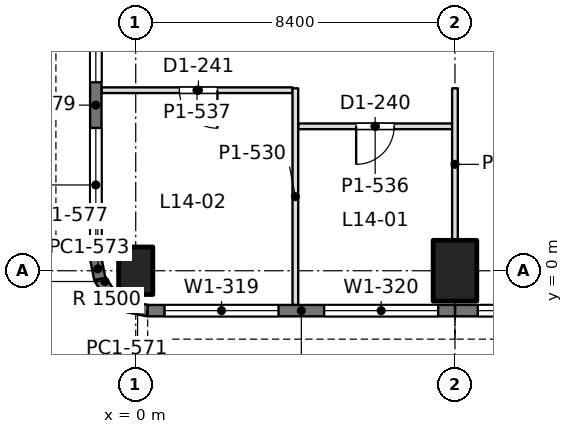
"""IFC4 building model, lengths in metres.
Left out: names, types, materials, properties, quantities, classifications, styles, units other than length and angle.
Written with IfcOpenShell. Run it as: python <this file> out.ifc"""

import sys

from ifc_helpers import new_model, si_unit, direction, frame, frame_2d, origin, origin_with_axes, origin_2d, place, context, subcontext, project, spatial, rectangle, extrude, element, fill, save


model = new_model("IFC4")
c1 = context("Model", 3, precision=1e-05, world=origin(), true_north=direction((0.0, 1.0)))
c2 = subcontext(c1, "Body", "Model", "MODEL_VIEW")
j1 = project(units=[si_unit("LENGTHUNIT", "METRE"), si_unit("PLANEANGLEUNIT", "RADIAN")], contexts=[c1])
p1 = place(None, origin())
s1 = spatial("IfcSite", under=j1, at=p1, CompositionType="ELEMENT")
p2 = place(p1, origin())
s2 = spatial("IfcBuilding", under=s1, at=p2, CompositionType="ELEMENT")
p3 = place(p2, frame((0.0, 0.0, 63.9)))
s3 = spatial("IfcBuildingStorey", under=s2, at=p3, CompositionType="ELEMENT", Elevation=63.9)
p4 = place(p3, origin_with_axes())
e1 = element("IfcColumn", 1, at=p4, inside=s3, PredefinedType="COLUMN", context=c2, shape_type="SweptSolid", body=[
    extrude(rectangle(XDim=0.9, YDim=1.25, at=origin_2d()), origin(), (0.0, 0.0, 1.0), 4.5),
])
p5 = place(p3, frame((8.4, 0.0, 0.0), z_axis=(0.0, 0.0, 1.0), x_axis=(1.0, 0.0, 0.0)))
e2 = element("IfcColumn", 2, at=p5, inside=s3, PredefinedType="COLUMN", context=c2, shape_type="SweptSolid", body=[
    extrude(rectangle(XDim=1.15, YDim=1.6, at=origin_2d()), origin(), (0.0, 0.0, 1.0), 4.5),
])
p6 = place(p3, frame((16.8, -1.05, 0.0), z_axis=(0.0, 0.0, 1.0), x_axis=(-1.0, 0.0, 0.0)))
e3 = element("IfcWall", 3, at=p6, inside=s3, PredefinedType="SOLIDWALL", context=c2, shape_type="SweptSolid", body=[
    extrude(rectangle(XDim=8.4, YDim=0.3, at=frame_2d((4.2, 0.0))), origin(), (0.0, 0.0, 1.0), 4.34),
])
p7 = place(p6, frame((0.6, 0.0, 0.9)))
e4 = element("IfcOpeningElement", 4, at=p7, cuts=e3, PredefinedType="OPENING", context=c2, shape_type="SweptSolid", body=[
    extrude(rectangle(XDim=3.0, YDim=1.9, at=frame_2d((1.5, 0.95))), frame((0.0, 0.16, 0.0), z_axis=(0.0, -1.0, 0.0), x_axis=(1.0, 0.0, 0.0)), (0.0, 0.0, 1.0), 0.32),
])
p8 = place(p6, frame((4.8, 0.0, 0.9)))
e5 = element("IfcOpeningElement", 5, at=p8, cuts=e3, PredefinedType="OPENING", context=c2, shape_type="SweptSolid", body=[
    extrude(rectangle(XDim=3.0, YDim=1.9, at=frame_2d((1.5, 0.95))), frame((0.0, 0.16, 0.0), z_axis=(0.0, -1.0, 0.0), x_axis=(1.0, 0.0, 0.0)), (0.0, 0.0, 1.0), 0.32),
])
p9 = place(p3, frame((8.4, -1.05, 0.0), z_axis=(0.0, 0.0, 1.0), x_axis=(-1.0, 0.0, 0.0)))
e6 = element("IfcWall", 6, at=p9, inside=s3, PredefinedType="SOLIDWALL", context=c2, shape_type="SweptSolid", body=[
    extrude(rectangle(XDim=8.085, YDim=0.3, at=frame_2d((4.042, 0.0))), origin(), (0.0, 0.0, 1.0), 4.34),
])
p10 = place(p9, frame((0.443, 0.0, 0.9)))
e7 = element("IfcOpeningElement", 7, at=p10, cuts=e6, PredefinedType="OPENING", context=c2, shape_type="SweptSolid", body=[
    extrude(rectangle(XDim=3.0, YDim=1.9, at=frame_2d((1.5, 0.95))), frame((0.0, 0.16, 0.0), z_axis=(0.0, -1.0, 0.0), x_axis=(1.0, 0.0, 0.0)), (0.0, 0.0, 1.0), 0.32),
])
p11 = place(p9, frame((4.643, 0.0, 0.9)))
e8 = element("IfcOpeningElement", 8, at=p11, cuts=e6, PredefinedType="OPENING", context=c2, shape_type="SweptSolid", body=[
    extrude(rectangle(XDim=3.0, YDim=1.9, at=frame_2d((1.5, 0.95))), frame((0.0, 0.16, 0.0), z_axis=(0.0, -1.0, 0.0), x_axis=(1.0, 0.0, 0.0)), (0.0, 0.0, 1.0), 0.32),
])
p12 = place(p3, frame((0.315, -1.05, 0.0), z_axis=(0.0, 0.0, 1.0), x_axis=(-0.980788534345, 0.195073962632, 0.0)))
e9 = element("IfcWall", 9, at=p12, inside=s3, PredefinedType="SOLIDWALL", context=c2, shape_type="SweptSolid", body=[
    extrude(rectangle(XDim=0.541, YDim=0.3, at=frame_2d((0.271, 0.0))), origin(), (0.0, 0.0, 1.0), 4.34),
])
for number, where, z_axis, x_axis in (
    (10, (-0.216, -0.945, 0.0), (0.0, 0.0, 1.0), (-0.831, 0.556, 0.0)),
    (11, (-0.653, -0.653, 0.0), (0.0, 0.0, 1.0), (-0.556, 0.831, 0.0)),
):
    element("IfcWall", number, at=place(p3, frame(where, z_axis=z_axis, x_axis=x_axis)), inside=s3, PredefinedType="SOLIDWALL", context=c2, shape_type="SweptSolid", body=[
        extrude(rectangle(XDim=0.526, YDim=0.3, at=frame_2d((0.263, 0.0))), origin(), (0.0, 0.0, 1.0), 4.34),
    ])
p13 = place(p3, frame((-0.945, -0.216, 0.0), z_axis=(0.0, 0.0, 1.0), x_axis=(-0.195073962632, 0.980788534345, 0.0)))
e12 = element("IfcWall", 12, at=p13, inside=s3, PredefinedType="SOLIDWALL", context=c2, shape_type="SweptSolid", body=[
    extrude(rectangle(XDim=0.541, YDim=0.3, at=frame_2d((0.271, 0.0))), origin(), (0.0, 0.0, 1.0), 4.34),
])
p14 = place(p3, frame((-1.05, 0.315, 0.0), z_axis=(0.0, 0.0, 1.0), x_axis=(0.0, 1.0, 0.0)))
e13 = element("IfcWall", 13, at=p14, inside=s3, PredefinedType="SOLIDWALL", context=c2, shape_type="SweptSolid", body=[
    extrude(rectangle(XDim=8.085, YDim=0.3, at=frame_2d((4.042, 0.0))), origin(), (0.0, 0.0, 1.0), 4.34),
])
p15 = place(p14, frame((0.443, 0.0, 0.9)))
e14 = element("IfcOpeningElement", 14, at=p15, cuts=e13, PredefinedType="OPENING", context=c2, shape_type="SweptSolid", body=[
    extrude(rectangle(XDim=3.0, YDim=1.9, at=frame_2d((1.5, 0.95))), frame((0.0, 0.16, 0.0), z_axis=(0.0, -1.0, 0.0), x_axis=(1.0, 0.0, 0.0)), (0.0, 0.0, 1.0), 0.32),
])
p16 = place(p14, frame((4.643, 0.0, 0.9)))
e15 = element("IfcOpeningElement", 15, at=p16, cuts=e13, PredefinedType="OPENING", context=c2, shape_type="SweptSolid", body=[
    extrude(rectangle(XDim=3.0, YDim=1.9, at=frame_2d((1.5, 0.95))), frame((0.0, 0.16, 0.0), z_axis=(0.0, -1.0, 0.0), x_axis=(1.0, 0.0, 0.0)), (0.0, 0.0, 1.0), 0.32),
])
p17 = place(p3, frame((-0.902, 4.75, 0.0), z_axis=(0.0, 0.0, 1.0), x_axis=(1.0, 0.0, 0.0)))
e16 = element("IfcWall", 16, at=p17, inside=s3, PredefinedType="PARTITIONING", context=c2, shape_type="SweptSolid", body=[
    extrude(rectangle(XDim=5.028, YDim=0.15, at=frame_2d((2.514, 0.0))), origin(), (0.0, 0.0, 1.0), 3.84),
])
p18 = place(p17, frame((2.052, 0.0, 0.0)))
e17 = element("IfcOpeningElement", 17, at=p18, cuts=e16, PredefinedType="OPENING", context=c2, shape_type="SweptSolid", body=[
    extrude(rectangle(XDim=1.0, YDim=2.2, at=frame_2d((0.5, 1.1))), frame((0.0, 0.085, 0.0), z_axis=(0.0, -1.0, 0.0), x_axis=(1.0, 0.0, 0.0)), (0.0, 0.0, 1.0), 0.17),
])
p19 = place(p3, frame((4.274, 3.8, 0.0), z_axis=(0.0, 0.0, 1.0), x_axis=(1.0, 0.0, 0.0)))
e18 = element("IfcWall", 18, at=p19, inside=s3, PredefinedType="PARTITIONING", context=c2, shape_type="SweptSolid", body=[
    extrude(rectangle(XDim=4.052, YDim=0.15, at=frame_2d((2.026, 0.0))), origin(), (0.0, 0.0, 1.0), 3.74),
])
p20 = place(p19, frame((1.526, 0.0, 0.0)))
e19 = element("IfcOpeningElement", 19, at=p20, cuts=e18, PredefinedType="OPENING", context=c2, shape_type="SweptSolid", body=[
    extrude(rectangle(XDim=1.0, YDim=2.2, at=frame_2d((0.5, 1.1))), frame((0.0, 0.085, 0.0), z_axis=(0.0, -1.0, 0.0), x_axis=(1.0, 0.0, 0.0)), (0.0, 0.0, 1.0), 0.17),
])
p21 = place(p3, frame((4.2, -0.902, 0.0), z_axis=(0.0, 0.0, 1.0), x_axis=(0.0, 1.0, 0.0)))
e20 = element("IfcWall", 20, at=p21, inside=s3, PredefinedType="PARTITIONING", context=c2, shape_type="SweptSolid", body=[
    extrude(rectangle(XDim=5.702, YDim=0.15, at=frame_2d((2.851, 0.0))), origin(), (0.0, 0.0, 1.0), 3.84),
])
p22 = place(p3, frame((8.4, 0.799, 0.0), z_axis=(0.0, 0.0, 1.0), x_axis=(0.0, 1.0, 0.0)))
e21 = element("IfcWall", 21, at=p22, inside=s3, PredefinedType="PARTITIONING", context=c2, shape_type="SweptSolid", body=[
    extrude(rectangle(XDim=4.001, YDim=0.15, at=frame_2d((2.0, 0.0))), origin(), (0.0, 0.0, 1.0), 3.74),
])
p23 = place(p8, origin())
e22 = element("IfcWindow", 22, at=p23, inside=s3, PartitioningType="SINGLE_PANEL", PredefinedType="WINDOW", context=c2, shape_type="SweptSolid", body=[
    extrude(rectangle(XDim=3.0, YDim=1.9, at=frame_2d((1.5, 0.95))), frame((0.0, 0.03, 0.0), z_axis=(0.0, -1.0, 0.0), x_axis=(1.0, 0.0, 0.0)), (0.0, 0.0, 1.0), 0.06),
])
fill(e5, e22)
p24 = place(p10, origin())
e23 = element("IfcWindow", 23, at=p24, inside=s3, PartitioningType="SINGLE_PANEL", PredefinedType="WINDOW", context=c2, shape_type="SweptSolid", body=[
    extrude(rectangle(XDim=3.0, YDim=1.9, at=frame_2d((1.5, 0.95))), frame((0.0, 0.03, 0.0), z_axis=(0.0, -1.0, 0.0), x_axis=(1.0, 0.0, 0.0)), (0.0, 0.0, 1.0), 0.06),
])
fill(e7, e23)
p25 = place(p11, origin())
e24 = element("IfcWindow", 24, at=p25, inside=s3, PartitioningType="SINGLE_PANEL", PredefinedType="WINDOW", context=c2, shape_type="SweptSolid", body=[
    extrude(rectangle(XDim=3.0, YDim=1.9, at=frame_2d((1.5, 0.95))), frame((0.0, 0.03, 0.0), z_axis=(0.0, -1.0, 0.0), x_axis=(1.0, 0.0, 0.0)), (0.0, 0.0, 1.0), 0.06),
])
fill(e8, e24)
p26 = place(p15, origin())
e25 = element("IfcWindow", 25, at=p26, inside=s3, PartitioningType="SINGLE_PANEL", PredefinedType="WINDOW", context=c2, shape_type="SweptSolid", body=[
    extrude(rectangle(XDim=3.0, YDim=1.9, at=frame_2d((1.5, 0.95))), frame((0.0, 0.03, 0.0), z_axis=(0.0, -1.0, 0.0), x_axis=(1.0, 0.0, 0.0)), (0.0, 0.0, 1.0), 0.06),
])
fill(e14, e25)
p27 = place(p16, origin())
e26 = element("IfcWindow", 26, at=p27, inside=s3, PartitioningType="SINGLE_PANEL", PredefinedType="WINDOW", context=c2, shape_type="SweptSolid", body=[
    extrude(rectangle(XDim=3.0, YDim=1.9, at=frame_2d((1.5, 0.95))), frame((0.0, 0.03, 0.0), z_axis=(0.0, -1.0, 0.0), x_axis=(1.0, 0.0, 0.0)), (0.0, 0.0, 1.0), 0.06),
])
fill(e15, e26)
p28 = place(p18, frame((1.0, 0.0, 0.0), z_axis=(0.0, 0.0, 1.0), x_axis=(-1.0, 0.0, 0.0)))
e27 = element("IfcDoor", 27, at=p28, inside=s3, OperationType="SINGLE_SWING_LEFT", PredefinedType="DOOR", context=c2, shape_type="SweptSolid", body=[
    extrude(rectangle(XDim=1.0, YDim=2.2, at=frame_2d((0.5, 1.1))), frame((0.0, 0.025, 0.0), z_axis=(0.0, -1.0, 0.0), x_axis=(1.0, 0.0, 0.0)), (0.0, 0.0, 1.0), 0.05),
])
fill(e17, e27)
p29 = place(p20, frame((1.0, 0.0, 0.0), z_axis=(0.0, 0.0, 1.0), x_axis=(-1.0, 0.0, 0.0)))
e28 = element("IfcDoor", 28, at=p29, inside=s3, OperationType="SINGLE_SWING_RIGHT", PredefinedType="DOOR", context=c2, shape_type="SweptSolid", body=[
    extrude(rectangle(XDim=1.0, YDim=2.2, at=frame_2d((0.5, 1.1))), frame((0.0, 0.025, 0.0), z_axis=(0.0, -1.0, 0.0), x_axis=(1.0, 0.0, 0.0)), (0.0, 0.0, 1.0), 0.05),
])
fill(e19, e28)
save(model, sys.argv[1])
